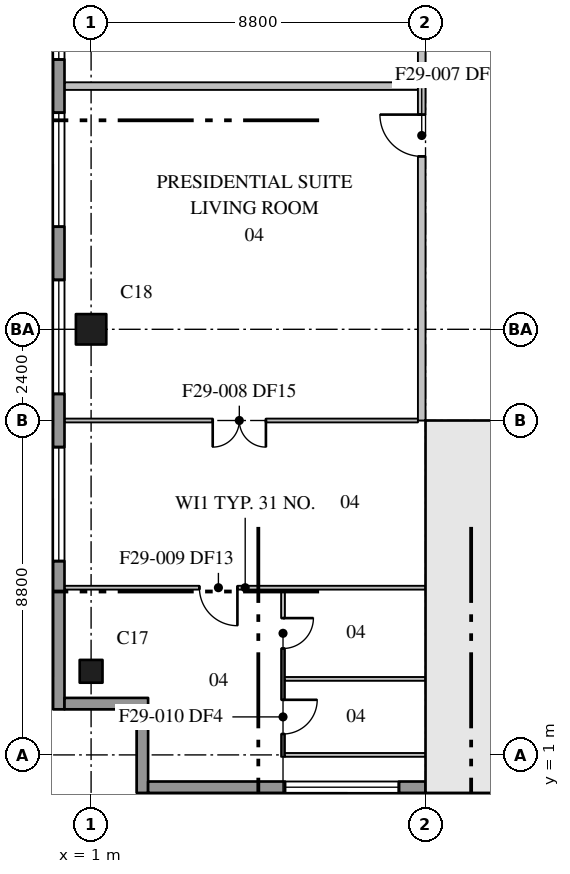
"""IFC4 building model, lengths in metres.
Left out: names, types, materials, properties, quantities, classifications, styles, units other than length and angle.
Written with IfcOpenShell. Run it as: python <this file> out.ifc"""

import sys

from ifc_helpers import new_model, si_unit, direction, frame, frame_2d, origin, origin_2d, place, context, subcontext, project, spatial, rectangle, extrude, element, fill, save


model = new_model("IFC4")
c1 = context("Model", 3, precision=1e-05, world=origin(), true_north=direction((0.0, 1.0)))
c2 = subcontext(c1, "Body", "Model", "MODEL_VIEW")
j1 = project(units=[si_unit("LENGTHUNIT", "METRE"), si_unit("PLANEANGLEUNIT", "RADIAN")], contexts=[c1])
p1 = place(None, origin())
s1 = spatial("IfcSite", under=j1, at=p1, CompositionType="ELEMENT")
p2 = place(p1, origin())
s2 = spatial("IfcBuilding", under=s1, at=p2, CompositionType="ELEMENT")
p3 = place(p2, frame((0.0, 0.0, 237.6)))
s3 = spatial("IfcBuildingStorey", under=s2, at=p3, CompositionType="ELEMENT", Elevation=237.6)
p4 = place(p3, frame((1.0, 3.2, 0.0), z_axis=(0.0, 0.0, 1.0), x_axis=(1.0, 0.0, 0.0)))
e1 = element("IfcColumn", 1, at=p4, inside=s3, PredefinedType="COLUMN", context=c2, shape_type="SweptSolid", body=[
    extrude(rectangle(XDim=0.6, YDim=0.6, at=origin_2d()), origin(), (0.0, 0.0, 1.0), 3.7),
])
p5 = place(p3, frame((1.0, 12.2, 0.0), z_axis=(0.0, 0.0, 1.0), x_axis=(1.0, 0.0, 0.0)))
e2 = element("IfcColumn", 2, at=p5, inside=s3, PredefinedType="COLUMN", context=c2, shape_type="SweptSolid", body=[
    extrude(rectangle(XDim=0.8, YDim=0.8, at=origin_2d()), origin(), (0.0, 0.0, 1.0), 3.7),
])
p6 = place(p3, frame((9.8, 0.95, 0.0), z_axis=(0.0, 0.0, 1.0), x_axis=(1.0, 0.0, 0.0)))
e3 = element("IfcWall", 3, at=p6, inside=s3, PredefinedType="SHEAR", context=c2, shape_type="SweptSolid", body=[
    extrude(rectangle(XDim=35.2, YDim=0.5, at=frame_2d((17.6, 0.0))), origin(), (0.0, 0.0, 1.0), 3.7),
])
p7 = place(p3, frame((10.75, 1.2, 0.0), z_axis=(0.0, 0.0, 1.0), x_axis=(0.0, 1.0, 0.0)))
e4 = element("IfcWall", 4, at=p7, inside=s3, PredefinedType="SHEAR", context=c2, shape_type="SweptSolid", body=[
    extrude(rectangle(XDim=8.6, YDim=0.5, at=frame_2d((4.3, 0.0))), origin(), (0.0, 0.0, 1.0), 3.7),
])
p8 = place(p3, frame((9.8, 9.6, 0.0), z_axis=(0.0, 0.0, 1.0), x_axis=(1.0, 0.0, 0.0)))
e5 = element("IfcWall", 5, at=p8, inside=s3, PredefinedType="SHEAR", context=c2, shape_type="SweptSolid", body=[
    extrude(rectangle(XDim=4.3, YDim=0.4, at=frame_2d((2.15, 0.0))), origin(), (0.0, 0.0, 1.0), 3.7),
])
p9 = place(p8, frame((2.05, 0.0, 0.0)))
e6 = element("IfcOpeningElement", 6, at=p9, cuts=e5, PredefinedType="OPENING", context=c2, shape_type="SweptSolid", body=[
    extrude(rectangle(XDim=1.2, YDim=2.1, at=frame_2d((0.6, 1.05))), frame((0.0, 0.21, 0.0), z_axis=(0.0, -1.0, 0.0), x_axis=(1.0, 0.0, 0.0)), (0.0, 0.0, 1.0), 0.42),
])
p10 = place(p3, frame((0.15, 61.1, 0.0), z_axis=(0.0, 0.0, 1.0), x_axis=(0.0, -1.0, 0.0)))
e7 = element("IfcWall", 7, at=p10, inside=s3, PredefinedType="STANDARD", context=c2, shape_type="SweptSolid", body=[
    extrude(rectangle(XDim=58.9, YDim=0.3, at=frame_2d((29.45, 0.0))), origin(), (0.0, 0.0, 1.0), 3.4),
])
p11 = place(p10, frame((3.6, 0.0, 0.75)))
e8 = element("IfcOpeningElement", 8, at=p11, cuts=e7, PredefinedType="OPENING", context=c2, shape_type="SweptSolid", body=[
    extrude(rectangle(XDim=3.0, YDim=2.3, at=frame_2d((1.5, 1.15))), frame((0.0, 0.16, 0.0), z_axis=(0.0, -1.0, 0.0), x_axis=(1.0, 0.0, 0.0)), (0.0, 0.0, 1.0), 0.32),
])
p12 = place(p10, frame((8.0, 0.0, 0.75)))
e9 = element("IfcOpeningElement", 9, at=p12, cuts=e7, PredefinedType="OPENING", context=c2, shape_type="SweptSolid", body=[
    extrude(rectangle(XDim=3.0, YDim=2.3, at=frame_2d((1.5, 1.15))), frame((0.0, 0.16, 0.0), z_axis=(0.0, -1.0, 0.0), x_axis=(1.0, 0.0, 0.0)), (0.0, 0.0, 1.0), 0.32),
])
p13 = place(p10, frame((12.4, 0.0, 0.75)))
e10 = element("IfcOpeningElement", 10, at=p13, cuts=e7, PredefinedType="OPENING", context=c2, shape_type="SweptSolid", body=[
    extrude(rectangle(XDim=3.0, YDim=2.3, at=frame_2d((1.5, 1.15))), frame((0.0, 0.16, 0.0), z_axis=(0.0, -1.0, 0.0), x_axis=(1.0, 0.0, 0.0)), (0.0, 0.0, 1.0), 0.32),
])
p14 = place(p10, frame((16.8, 0.0, 0.75)))
e11 = element("IfcOpeningElement", 11, at=p14, cuts=e7, PredefinedType="OPENING", context=c2, shape_type="SweptSolid", body=[
    extrude(rectangle(XDim=3.0, YDim=2.3, at=frame_2d((1.5, 1.15))), frame((0.0, 0.16, 0.0), z_axis=(0.0, -1.0, 0.0), x_axis=(1.0, 0.0, 0.0)), (0.0, 0.0, 1.0), 0.32),
])
p15 = place(p10, frame((21.2, 0.0, 0.75)))
e12 = element("IfcOpeningElement", 12, at=p15, cuts=e7, PredefinedType="OPENING", context=c2, shape_type="SweptSolid", body=[
    extrude(rectangle(XDim=3.0, YDim=2.3, at=frame_2d((1.5, 1.15))), frame((0.0, 0.16, 0.0), z_axis=(0.0, -1.0, 0.0), x_axis=(1.0, 0.0, 0.0)), (0.0, 0.0, 1.0), 0.32),
])
p16 = place(p10, frame((25.6, 0.0, 0.75)))
e13 = element("IfcOpeningElement", 13, at=p16, cuts=e7, PredefinedType="OPENING", context=c2, shape_type="SweptSolid", body=[
    extrude(rectangle(XDim=3.0, YDim=2.3, at=frame_2d((1.5, 1.15))), frame((0.0, 0.16, 0.0), z_axis=(0.0, -1.0, 0.0), x_axis=(1.0, 0.0, 0.0)), (0.0, 0.0, 1.0), 0.32),
])
p17 = place(p10, frame((30.0, 0.0, 0.75)))
e14 = element("IfcOpeningElement", 14, at=p17, cuts=e7, PredefinedType="OPENING", context=c2, shape_type="SweptSolid", body=[
    extrude(rectangle(XDim=3.0, YDim=2.3, at=frame_2d((1.5, 1.15))), frame((0.0, 0.16, 0.0), z_axis=(0.0, -1.0, 0.0), x_axis=(1.0, 0.0, 0.0)), (0.0, 0.0, 1.0), 0.32),
])
p18 = place(p10, frame((34.4, 0.0, 0.75)))
e15 = element("IfcOpeningElement", 15, at=p18, cuts=e7, PredefinedType="OPENING", context=c2, shape_type="SweptSolid", body=[
    extrude(rectangle(XDim=3.0, YDim=2.3, at=frame_2d((1.5, 1.15))), frame((0.0, 0.16, 0.0), z_axis=(0.0, -1.0, 0.0), x_axis=(1.0, 0.0, 0.0)), (0.0, 0.0, 1.0), 0.32),
])
p19 = place(p10, frame((38.8, 0.0, 0.75)))
e16 = element("IfcOpeningElement", 16, at=p19, cuts=e7, PredefinedType="OPENING", context=c2, shape_type="SweptSolid", body=[
    extrude(rectangle(XDim=3.0, YDim=2.3, at=frame_2d((1.5, 1.15))), frame((0.0, 0.16, 0.0), z_axis=(0.0, -1.0, 0.0), x_axis=(1.0, 0.0, 0.0)), (0.0, 0.0, 1.0), 0.32),
])
p20 = place(p10, frame((43.2, 0.0, 0.75)))
e17 = element("IfcOpeningElement", 17, at=p20, cuts=e7, PredefinedType="OPENING", context=c2, shape_type="SweptSolid", body=[
    extrude(rectangle(XDim=3.0, YDim=2.3, at=frame_2d((1.5, 1.15))), frame((0.0, 0.16, 0.0), z_axis=(0.0, -1.0, 0.0), x_axis=(1.0, 0.0, 0.0)), (0.0, 0.0, 1.0), 0.32),
])
p21 = place(p10, frame((47.6, 0.0, 0.75)))
e18 = element("IfcOpeningElement", 18, at=p21, cuts=e7, PredefinedType="OPENING", context=c2, shape_type="SweptSolid", body=[
    extrude(rectangle(XDim=3.0, YDim=2.3, at=frame_2d((1.5, 1.15))), frame((0.0, 0.16, 0.0), z_axis=(0.0, -1.0, 0.0), x_axis=(1.0, 0.0, 0.0)), (0.0, 0.0, 1.0), 0.32),
])
p22 = place(p10, frame((52.0, 0.0, 0.75)))
e19 = element("IfcOpeningElement", 19, at=p22, cuts=e7, PredefinedType="OPENING", context=c2, shape_type="SweptSolid", body=[
    extrude(rectangle(XDim=3.0, YDim=2.3, at=frame_2d((1.5, 1.15))), frame((0.0, 0.16, 0.0), z_axis=(0.0, -1.0, 0.0), x_axis=(1.0, 0.0, 0.0)), (0.0, 0.0, 1.0), 0.32),
])
for number, where, z_axis, x_axis in (
    (20, (0.3, 2.35, 0.0), (0.0, 0.0, 1.0), (1.0, 0.0, 0.0)),
    (21, (2.35, 2.2, 0.0), (0.0, 0.0, 1.0), (0.0, -1.0, 0.0)),
):
    element("IfcWall", number, at=place(p3, frame(where, z_axis=z_axis, x_axis=x_axis)), inside=s3, PredefinedType="STANDARD", context=c2, shape_type="SweptSolid", body=[
        extrude(rectangle(XDim=2.2, YDim=0.3, at=frame_2d((1.1, 0.0))), origin(), (0.0, 0.0, 1.0), 3.4),
    ])
p23 = place(p3, frame((2.5, 0.15, 0.0), z_axis=(0.0, 0.0, 1.0), x_axis=(1.0, 0.0, 0.0)))
e22 = element("IfcWall", 22, at=p23, inside=s3, PredefinedType="STANDARD", context=c2, shape_type="SweptSolid", body=[
    extrude(rectangle(XDim=7.3, YDim=0.3, at=frame_2d((3.65, 0.0))), origin(), (0.0, 0.0, 1.0), 3.4),
])
p24 = place(p23, frame((3.6, 0.0, 0.75)))
e23 = element("IfcOpeningElement", 23, at=p24, cuts=e22, PredefinedType="OPENING", context=c2, shape_type="SweptSolid", body=[
    extrude(rectangle(XDim=3.0, YDim=2.3, at=frame_2d((1.5, 1.15))), frame((0.0, 0.16, 0.0), z_axis=(0.0, -1.0, 0.0), x_axis=(1.0, 0.0, 0.0)), (0.0, 0.0, 1.0), 0.32),
])
p25 = place(p3, frame((9.7, 9.8, 0.0), z_axis=(0.0, 0.0, 1.0), x_axis=(0.0, 1.0, 0.0)))
e24 = element("IfcWall", 24, at=p25, inside=s3, PredefinedType="PARTITIONING", context=c2, shape_type="SweptSolid", body=[
    extrude(rectangle(XDim=48.0, YDim=0.2, at=frame_2d((24.0, 0.0))), origin(), (0.0, 0.0, 1.0), 3.4),
])
p26 = place(p25, frame((6.95, 0.0, 0.0)))
e25 = element("IfcOpeningElement", 25, at=p26, cuts=e24, PredefinedType="OPENING", context=c2, shape_type="SweptSolid", body=[
    extrude(rectangle(XDim=1.1, YDim=2.1, at=frame_2d((0.55, 1.05))), frame((0.0, 0.11, 0.0), z_axis=(0.0, -1.0, 0.0), x_axis=(1.0, 0.0, 0.0)), (0.0, 0.0, 1.0), 0.22),
])
p27 = place(p25, frame((14.85, 0.0, 0.0)))
e26 = element("IfcOpeningElement", 26, at=p27, cuts=e24, PredefinedType="OPENING", context=c2, shape_type="SweptSolid", body=[
    extrude(rectangle(XDim=1.1, YDim=2.1, at=frame_2d((0.55, 1.05))), frame((0.0, 0.11, 0.0), z_axis=(0.0, -1.0, 0.0), x_axis=(1.0, 0.0, 0.0)), (0.0, 0.0, 1.0), 0.22),
])
p28 = place(p25, frame((37.75, 0.0, 0.0)))
e27 = element("IfcOpeningElement", 27, at=p28, cuts=e24, PredefinedType="OPENING", context=c2, shape_type="SweptSolid", body=[
    extrude(rectangle(XDim=1.1, YDim=2.1, at=frame_2d((0.55, 1.05))), frame((0.0, 0.11, 0.0), z_axis=(0.0, -1.0, 0.0), x_axis=(1.0, 0.0, 0.0)), (0.0, 0.0, 1.0), 0.22),
])
p29 = place(p25, frame((41.05, 0.0, 0.0)))
e28 = element("IfcOpeningElement", 28, at=p29, cuts=e24, PredefinedType="OPENING", context=c2, shape_type="SweptSolid", body=[
    extrude(rectangle(XDim=1.1, YDim=2.1, at=frame_2d((0.55, 1.05))), frame((0.0, 0.11, 0.0), z_axis=(0.0, -1.0, 0.0), x_axis=(1.0, 0.0, 0.0)), (0.0, 0.0, 1.0), 0.22),
])
p30 = place(p3, frame((0.31, 18.6, 0.0), z_axis=(0.0, 0.0, 1.0), x_axis=(1.0, 0.0, 0.0)))
e29 = element("IfcWall", 29, at=p30, inside=s3, PredefinedType="PARTITIONING", context=c2, shape_type="SweptSolid", body=[
    extrude(rectangle(XDim=9.29, YDim=0.2, at=frame_2d((4.645, 0.0))), origin(), (0.0, 0.0, 1.0), 3.4),
])
p31 = place(p3, frame((6.05, 5.35, 0.0), z_axis=(0.0, 0.0, 1.0), x_axis=(0.0, -1.0, 0.0)))
e30 = element("IfcWall", 30, at=p31, inside=s3, PredefinedType="PARTITIONING", context=c2, shape_type="SweptSolid", body=[
    extrude(rectangle(XDim=4.4, YDim=0.1, at=frame_2d((2.2, 0.0))), origin(), (0.0, 0.0, 1.0), 3.4),
])
p32 = place(p31, frame((2.9, 0.0, 0.0)))
e31 = element("IfcOpeningElement", 31, at=p32, cuts=e30, PredefinedType="OPENING", context=c2, shape_type="SweptSolid", body=[
    extrude(rectangle(XDim=0.9, YDim=2.1, at=frame_2d((0.45, 1.05))), frame((0.0, 0.06, 0.0), z_axis=(0.0, -1.0, 0.0), x_axis=(1.0, 0.0, 0.0)), (0.0, 0.0, 1.0), 0.12),
])
p33 = place(p31, frame((0.75, 0.0, 0.0)))
e32 = element("IfcOpeningElement", 32, at=p33, cuts=e30, PredefinedType="OPENING", context=c2, shape_type="SweptSolid", body=[
    extrude(rectangle(XDim=0.8, YDim=2.1, at=frame_2d((0.4, 1.05))), frame((0.0, 0.06, 0.0), z_axis=(0.0, -1.0, 0.0), x_axis=(1.0, 0.0, 0.0)), (0.0, 0.0, 1.0), 0.12),
])
p34 = place(p3, frame((9.6, 9.8, 0.0), z_axis=(0.0, 0.0, 1.0), x_axis=(-1.0, 0.0, 0.0)))
e33 = element("IfcWall", 33, at=p34, inside=s3, PredefinedType="PARTITIONING", context=c2, shape_type="SweptSolid", body=[
    extrude(rectangle(XDim=9.29, YDim=0.1, at=frame_2d((4.645, 0.0))), origin(), (0.0, 0.0, 1.0), 3.4),
])
p35 = place(p34, frame((4.0, 0.0, 0.0)))
e34 = element("IfcOpeningElement", 34, at=p35, cuts=e33, PredefinedType="OPENING", context=c2, shape_type="SweptSolid", body=[
    extrude(rectangle(XDim=1.4, YDim=2.1, at=frame_2d((0.7, 1.05))), frame((0.0, 0.06, 0.0), z_axis=(0.0, -1.0, 0.0), x_axis=(1.0, 0.0, 0.0)), (0.0, 0.0, 1.0), 0.12),
])
p36 = place(p3, frame((9.8, 5.4, 0.0), z_axis=(0.0, 0.0, 1.0), x_axis=(-1.0, 0.0, 0.0)))
e35 = element("IfcWall", 35, at=p36, inside=s3, PredefinedType="PARTITIONING", context=c2, shape_type="SweptSolid", body=[
    extrude(rectangle(XDim=9.49, YDim=0.1, at=frame_2d((4.745, 0.0))), origin(), (0.0, 0.0, 1.0), 3.4),
])
p37 = place(p36, frame((4.95, 0.0, 0.0)))
e36 = element("IfcOpeningElement", 36, at=p37, cuts=e35, PredefinedType="OPENING", context=c2, shape_type="SweptSolid", body=[
    extrude(rectangle(XDim=1.0, YDim=2.1, at=frame_2d((0.5, 1.05))), frame((0.0, 0.06, 0.0), z_axis=(0.0, -1.0, 0.0), x_axis=(1.0, 0.0, 0.0)), (0.0, 0.0, 1.0), 0.12),
])
for number, where, z_axis, x_axis in (
    (37, (6.1, 1.0, 0.0), (0.0, 0.0, 1.0), (1.0, 0.0, 0.0)),
    (38, (6.1, 3.0, 0.0), (0.0, 0.0, 1.0), (1.0, 0.0, 0.0)),
):
    element("IfcWall", number, at=place(p3, frame(where, z_axis=z_axis, x_axis=x_axis)), inside=s3, PredefinedType="PARTITIONING", context=c2, shape_type="SweptSolid", body=[
        extrude(rectangle(XDim=3.7, YDim=0.1, at=frame_2d((1.85, 0.0))), origin(), (0.0, 0.0, 1.0), 3.4),
    ])
p38 = place(p19, origin())
e39 = element("IfcWindow", 39, at=p38, inside=s3, PartitioningType="SINGLE_PANEL", PredefinedType="WINDOW", context=c2, shape_type="SweptSolid", body=[
    extrude(rectangle(XDim=3.0, YDim=2.3, at=frame_2d((1.5, 1.15))), frame((0.0, 0.03, 0.0), z_axis=(0.0, -1.0, 0.0), x_axis=(1.0, 0.0, 0.0)), (0.0, 0.0, 1.0), 0.06),
])
fill(e16, e39)
p39 = place(p20, origin())
e40 = element("IfcWindow", 40, at=p39, inside=s3, PartitioningType="SINGLE_PANEL", PredefinedType="WINDOW", context=c2, shape_type="SweptSolid", body=[
    extrude(rectangle(XDim=3.0, YDim=2.3, at=frame_2d((1.5, 1.15))), frame((0.0, 0.03, 0.0), z_axis=(0.0, -1.0, 0.0), x_axis=(1.0, 0.0, 0.0)), (0.0, 0.0, 1.0), 0.06),
])
fill(e17, e40)
p40 = place(p21, origin())
e41 = element("IfcWindow", 41, at=p40, inside=s3, PartitioningType="SINGLE_PANEL", PredefinedType="WINDOW", context=c2, shape_type="SweptSolid", body=[
    extrude(rectangle(XDim=3.0, YDim=2.3, at=frame_2d((1.5, 1.15))), frame((0.0, 0.03, 0.0), z_axis=(0.0, -1.0, 0.0), x_axis=(1.0, 0.0, 0.0)), (0.0, 0.0, 1.0), 0.06),
])
fill(e18, e41)
p41 = place(p22, origin())
e42 = element("IfcWindow", 42, at=p41, inside=s3, PartitioningType="SINGLE_PANEL", PredefinedType="WINDOW", context=c2, shape_type="SweptSolid", body=[
    extrude(rectangle(XDim=3.0, YDim=2.3, at=frame_2d((1.5, 1.15))), frame((0.0, 0.03, 0.0), z_axis=(0.0, -1.0, 0.0), x_axis=(1.0, 0.0, 0.0)), (0.0, 0.0, 1.0), 0.06),
])
fill(e19, e42)
p42 = place(p24, origin())
e43 = element("IfcWindow", 43, at=p42, inside=s3, PartitioningType="SINGLE_PANEL", PredefinedType="WINDOW", context=c2, shape_type="SweptSolid", body=[
    extrude(rectangle(XDim=3.0, YDim=2.3, at=frame_2d((1.5, 1.15))), frame((0.0, 0.03, 0.0), z_axis=(0.0, -1.0, 0.0), x_axis=(1.0, 0.0, 0.0)), (0.0, 0.0, 1.0), 0.06),
])
fill(e23, e43)
p43 = place(p26, origin())
e44 = element("IfcDoor", 44, at=p43, inside=s3, OperationType="SINGLE_SWING_RIGHT", PredefinedType="DOOR", context=c2, shape_type="SweptSolid", body=[
    extrude(rectangle(XDim=1.1, YDim=2.1, at=frame_2d((0.55, 1.05))), frame((0.0, 0.025, 0.0), z_axis=(0.0, -1.0, 0.0), x_axis=(1.0, 0.0, 0.0)), (0.0, 0.0, 1.0), 0.05),
])
fill(e25, e44)
p44 = place(p35, origin())
e45 = element("IfcDoor", 45, at=p44, inside=s3, OperationType="DOUBLE_DOOR_SINGLE_SWING", PredefinedType="DOOR", context=c2, shape_type="SweptSolid", body=[
    extrude(rectangle(XDim=1.4, YDim=2.1, at=frame_2d((0.7, 1.05))), frame((0.0, 0.025, 0.0), z_axis=(0.0, -1.0, 0.0), x_axis=(1.0, 0.0, 0.0)), (0.0, 0.0, 1.0), 0.05),
])
fill(e34, e45)
p45 = place(p37, origin())
e46 = element("IfcDoor", 46, at=p45, inside=s3, OperationType="SINGLE_SWING_LEFT", PredefinedType="DOOR", context=c2, shape_type="SweptSolid", body=[
    extrude(rectangle(XDim=1.0, YDim=2.1, at=frame_2d((0.5, 1.05))), frame((0.0, 0.025, 0.0), z_axis=(0.0, -1.0, 0.0), x_axis=(1.0, 0.0, 0.0)), (0.0, 0.0, 1.0), 0.05),
])
fill(e36, e46)
p46 = place(p32, origin())
e47 = element("IfcDoor", 47, at=p46, inside=s3, OperationType="SINGLE_SWING_LEFT", PredefinedType="DOOR", context=c2, shape_type="SweptSolid", body=[
    extrude(rectangle(XDim=0.9, YDim=2.1, at=frame_2d((0.45, 1.05))), frame((0.0, 0.025, 0.0), z_axis=(0.0, -1.0, 0.0), x_axis=(1.0, 0.0, 0.0)), (0.0, 0.0, 1.0), 0.05),
])
fill(e31, e47)
p47 = place(p33, origin())
e48 = element("IfcDoor", 48, at=p47, inside=s3, OperationType="SINGLE_SWING_LEFT", PredefinedType="DOOR", context=c2, shape_type="SweptSolid", body=[
    extrude(rectangle(XDim=0.8, YDim=2.1, at=frame_2d((0.4, 1.05))), frame((0.0, 0.025, 0.0), z_axis=(0.0, -1.0, 0.0), x_axis=(1.0, 0.0, 0.0)), (0.0, 0.0, 1.0), 0.05),
])
fill(e32, e48)
save(model, sys.argv[1])
